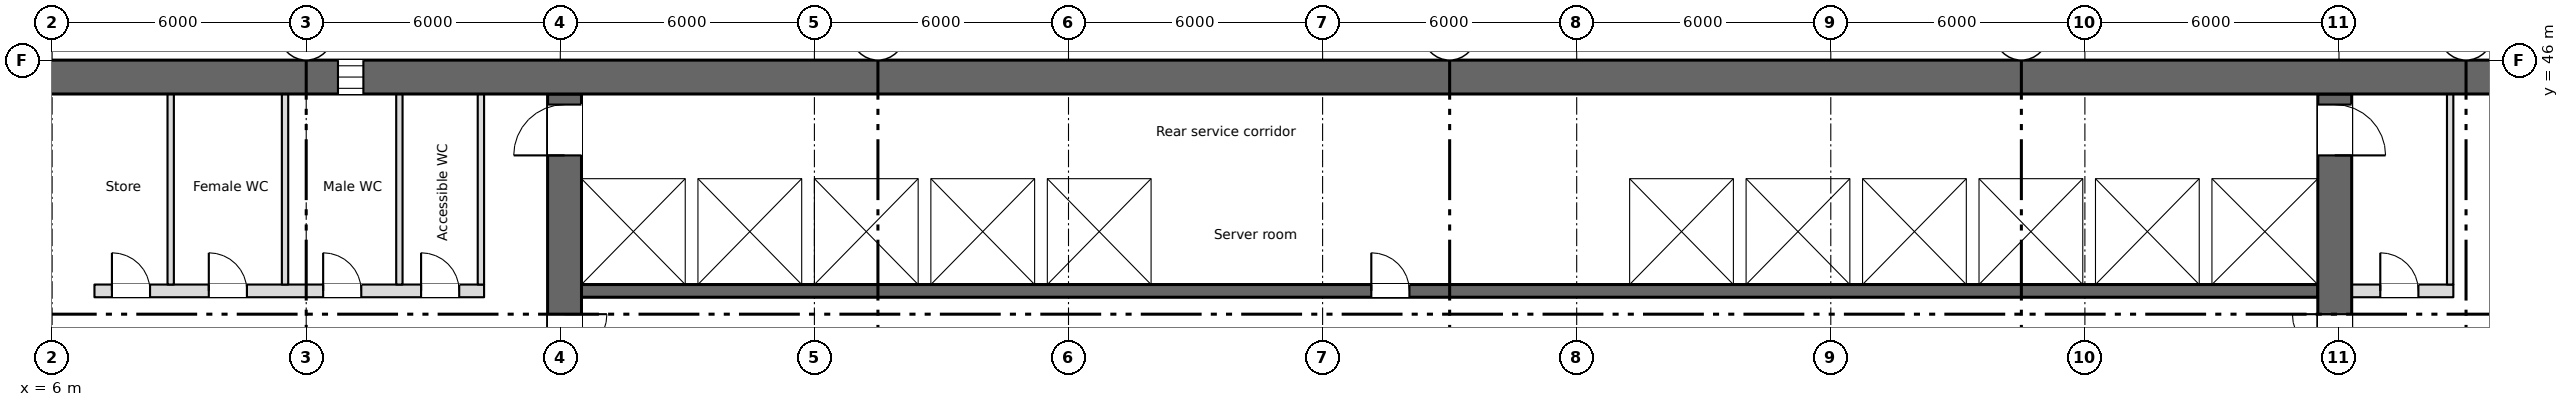
"""IFC4 building model, lengths in metres.
Left out: names, types, materials, properties, quantities, classifications, styles, units other than length and angle.
Written with IfcOpenShell. Run it as: python <this file> out.ifc"""

import sys

from ifc_helpers import new_model, si_unit, direction, frame, frame_2d, origin, place, context, subcontext, project, spatial, rectangle, extrude, element, fill, save


model = new_model("IFC4")
c1 = context("Model", 3, precision=1e-05, world=origin(), true_north=direction((0.0, 1.0)))
c2 = subcontext(c1, "Body", "Model", "MODEL_VIEW")
j1 = project(units=[si_unit("LENGTHUNIT", "METRE"), si_unit("PLANEANGLEUNIT", "RADIAN")], contexts=[c1])
p1 = place(None, origin())
s1 = spatial("IfcSite", under=j1, at=p1, CompositionType="ELEMENT")
p2 = place(p1, origin())
s2 = spatial("IfcBuilding", under=s1, at=p2, CompositionType="ELEMENT")
p3 = place(p2, frame((0.0, 0.0, 128.75)))
s3 = spatial("IfcBuildingStorey", under=s2, at=p3, CompositionType="ELEMENT", Elevation=128.75)
p4 = place(p3, frame((5.55, 45.6, 0.0), z_axis=(0.0, 0.0, 1.0), x_axis=(1.0, 0.0, 0.0)))
e1 = element("IfcWall", 1, at=p4, inside=s3, PredefinedType="SHEAR", context=c2, shape_type="SweptSolid", body=[
    extrude(rectangle(XDim=60.9, YDim=0.8, at=frame_2d((30.45, 0.0))), origin(), (0.0, 0.0, 1.0), 3.35),
])
p5 = place(p4, frame((7.2, 0.0, 0.6)))
e2 = element("IfcOpeningElement", 2, at=p5, cuts=e1, PredefinedType="OPENING", context=c2, shape_type="SweptSolid", body=[
    extrude(rectangle(XDim=0.6, YDim=2.4, at=frame_2d((0.3, 1.2))), frame((0.0, 0.41, 0.0), z_axis=(0.0, -1.0, 0.0), x_axis=(1.0, 0.0, 0.0)), (0.0, 0.0, 1.0), 0.82),
])
p6 = place(p3, frame((6.85, 28.4, 0.0), z_axis=(0.0, 0.0, 1.0), x_axis=(0.0, 1.0, 0.0)))
e3 = element("IfcWall", 3, at=p6, inside=s3, PredefinedType="SHEAR", context=c2, shape_type="SweptSolid", body=[
    extrude(rectangle(XDim=16.8, YDim=0.3, at=frame_2d((8.4, 0.0))), origin(), (0.0, 0.0, 1.0), 3.35),
])
p7 = place(p3, frame((18.1, 28.4, 0.0), z_axis=(0.0, 0.0, 1.0), x_axis=(0.0, 1.0, 0.0)))
e4 = element("IfcWall", 4, at=p7, inside=s3, PredefinedType="SHEAR", context=c2, shape_type="SweptSolid", body=[
    extrude(rectangle(XDim=16.8, YDim=0.8, at=frame_2d((8.4, 0.0))), origin(), (0.0, 0.0, 1.0), 3.35),
])
p8 = place(p7, frame((9.6, 0.0, 0.0)))
e5 = element("IfcOpeningElement", 5, at=p8, cuts=e4, PredefinedType="OPENING", context=c2, shape_type="SweptSolid", body=[
    extrude(rectangle(XDim=2.0, YDim=2.1, at=frame_2d((1.0, 1.05))), frame((0.0, 0.41, 0.0), z_axis=(0.0, -1.0, 0.0), x_axis=(1.0, 0.0, 0.0)), (0.0, 0.0, 1.0), 0.82),
])
p9 = place(p7, frame((15.35, 0.0, 0.0)))
e6 = element("IfcOpeningElement", 6, at=p9, cuts=e4, PredefinedType="OPENING", context=c2, shape_type="SweptSolid", body=[
    extrude(rectangle(XDim=1.2, YDim=2.1, at=frame_2d((0.6, 1.05))), frame((0.0, 0.41, 0.0), z_axis=(0.0, -1.0, 0.0), x_axis=(1.0, 0.0, 0.0)), (0.0, 0.0, 1.0), 0.82),
])
p10 = place(p3, frame((59.9, 28.4, 0.0), z_axis=(0.0, 0.0, 1.0), x_axis=(0.0, 1.0, 0.0)))
e7 = element("IfcWall", 7, at=p10, inside=s3, PredefinedType="SHEAR", context=c2, shape_type="SweptSolid", body=[
    extrude(rectangle(XDim=16.8, YDim=0.8, at=frame_2d((8.4, 0.0))), origin(), (0.0, 0.0, 1.0), 3.35),
])
p11 = place(p10, frame((9.6, 0.0, 0.0)))
e8 = element("IfcOpeningElement", 8, at=p11, cuts=e7, PredefinedType="OPENING", context=c2, shape_type="SweptSolid", body=[
    extrude(rectangle(XDim=2.0, YDim=2.1, at=frame_2d((1.0, 1.05))), frame((0.0, 0.41, 0.0), z_axis=(0.0, -1.0, 0.0), x_axis=(1.0, 0.0, 0.0)), (0.0, 0.0, 1.0), 0.82),
])
p12 = place(p10, frame((15.35, 0.0, 0.0)))
e9 = element("IfcOpeningElement", 9, at=p12, cuts=e7, PredefinedType="OPENING", context=c2, shape_type="SweptSolid", body=[
    extrude(rectangle(XDim=1.2, YDim=2.1, at=frame_2d((0.6, 1.05))), frame((0.0, 0.41, 0.0), z_axis=(0.0, -1.0, 0.0), x_axis=(1.0, 0.0, 0.0)), (0.0, 0.0, 1.0), 0.82),
])
p13 = place(p3, frame((18.5, 40.55, 0.0), z_axis=(0.0, 0.0, 1.0), x_axis=(1.0, 0.0, 0.0)))
e10 = element("IfcWall", 10, at=p13, inside=s3, PredefinedType="SHEAR", context=c2, shape_type="SweptSolid", body=[
    extrude(rectangle(XDim=41.0, YDim=0.3, at=frame_2d((20.5, 0.0))), origin(), (0.0, 0.0, 1.0), 3.35),
])
p14 = place(p13, frame((18.65, 0.0, 0.0)))
e11 = element("IfcOpeningElement", 11, at=p14, cuts=e10, PredefinedType="OPENING", context=c2, shape_type="SweptSolid", body=[
    extrude(rectangle(XDim=0.9, YDim=2.1, at=frame_2d((0.45, 1.05))), frame((0.0, 0.16, 0.0), z_axis=(0.0, -1.0, 0.0), x_axis=(1.0, 0.0, 0.0)), (0.0, 0.0, 1.0), 0.32),
])
p15 = place(p13, frame((6.175, 0.0, 0.0)))
e12 = element("IfcOpeningElement", 12, at=p15, cuts=e10, PredefinedType="OPENING", context=c2, shape_type="SweptSolid", body=[
    extrude(rectangle(XDim=1.1, YDim=2.1, at=frame_2d((0.55, 1.05))), frame((0.0, 0.16, 0.0), z_axis=(0.0, -1.0, 0.0), x_axis=(1.0, 0.0, 0.0)), (0.0, 0.0, 1.0), 0.32),
])
p16 = place(p13, frame((8.925, 0.0, 0.0)))
e13 = element("IfcOpeningElement", 13, at=p16, cuts=e10, PredefinedType="OPENING", context=c2, shape_type="SweptSolid", body=[
    extrude(rectangle(XDim=1.1, YDim=2.1, at=frame_2d((0.55, 1.05))), frame((0.0, 0.16, 0.0), z_axis=(0.0, -1.0, 0.0), x_axis=(1.0, 0.0, 0.0)), (0.0, 0.0, 1.0), 0.32),
])
p17 = place(p13, frame((11.675, 0.0, 0.0)))
e14 = element("IfcOpeningElement", 14, at=p17, cuts=e10, PredefinedType="OPENING", context=c2, shape_type="SweptSolid", body=[
    extrude(rectangle(XDim=1.1, YDim=2.1, at=frame_2d((0.55, 1.05))), frame((0.0, 0.16, 0.0), z_axis=(0.0, -1.0, 0.0), x_axis=(1.0, 0.0, 0.0)), (0.0, 0.0, 1.0), 0.32),
])
p18 = place(p13, frame((30.925, 0.0, 0.0)))
e15 = element("IfcOpeningElement", 15, at=p18, cuts=e10, PredefinedType="OPENING", context=c2, shape_type="SweptSolid", body=[
    extrude(rectangle(XDim=1.1, YDim=2.1, at=frame_2d((0.55, 1.05))), frame((0.0, 0.16, 0.0), z_axis=(0.0, -1.0, 0.0), x_axis=(1.0, 0.0, 0.0)), (0.0, 0.0, 1.0), 0.32),
])
p19 = place(p13, frame((33.675, 0.0, 0.0)))
e16 = element("IfcOpeningElement", 16, at=p19, cuts=e10, PredefinedType="OPENING", context=c2, shape_type="SweptSolid", body=[
    extrude(rectangle(XDim=1.1, YDim=2.1, at=frame_2d((0.55, 1.05))), frame((0.0, 0.16, 0.0), z_axis=(0.0, -1.0, 0.0), x_axis=(1.0, 0.0, 0.0)), (0.0, 0.0, 1.0), 0.32),
])
p20 = place(p13, frame((36.375, 0.0, 0.0)))
e17 = element("IfcOpeningElement", 17, at=p20, cuts=e10, PredefinedType="OPENING", context=c2, shape_type="SweptSolid", body=[
    extrude(rectangle(XDim=1.2, YDim=2.1, at=frame_2d((0.6, 1.05))), frame((0.0, 0.16, 0.0), z_axis=(0.0, -1.0, 0.0), x_axis=(1.0, 0.0, 0.0)), (0.0, 0.0, 1.0), 0.32),
])
p21 = place(p13, frame((39.15, 0.0, 0.0)))
e18 = element("IfcOpeningElement", 18, at=p21, cuts=e10, PredefinedType="OPENING", context=c2, shape_type="SweptSolid", body=[
    extrude(rectangle(XDim=1.2, YDim=2.1, at=frame_2d((0.6, 1.05))), frame((0.0, 0.16, 0.0), z_axis=(0.0, -1.0, 0.0), x_axis=(1.0, 0.0, 0.0)), (0.0, 0.0, 1.0), 0.32),
])
p22 = place(p3, frame((18.5, 43.35, 0.0), z_axis=(0.0, 0.0, 1.0), x_axis=(1.0, 0.0, 0.0)))
e19 = element("IfcWall", 19, at=p22, inside=s3, PredefinedType="SHEAR", context=c2, shape_type="SweptSolid", body=[
    extrude(rectangle(XDim=41.0, YDim=0.3, at=frame_2d((20.5, 0.0))), origin(), (0.0, 0.0, 1.0), 3.35),
])
p23 = place(p3, frame((7.0, 40.55, 0.0), z_axis=(0.0, 0.0, 1.0), x_axis=(1.0, 0.0, 0.0)))
e20 = element("IfcWall", 20, at=p23, inside=s3, PredefinedType="PARTITIONING", context=c2, shape_type="SweptSolid", body=[
    extrude(rectangle(XDim=9.2, YDim=0.3, at=frame_2d((4.6, 0.0))), origin(), (0.0, 0.0, 1.0), 3.35),
])
p24 = place(p23, frame((0.413, 0.0, 0.0)))
e21 = element("IfcOpeningElement", 21, at=p24, cuts=e20, PredefinedType="OPENING", context=c2, shape_type="SweptSolid", body=[
    extrude(rectangle(XDim=0.9, YDim=2.1, at=frame_2d((0.45, 1.05))), frame((0.0, 0.16, 0.0), z_axis=(0.0, -1.0, 0.0), x_axis=(1.0, 0.0, 0.0)), (0.0, 0.0, 1.0), 0.32),
])
p25 = place(p23, frame((2.7, 0.0, 0.0)))
e22 = element("IfcOpeningElement", 22, at=p25, cuts=e20, PredefinedType="OPENING", context=c2, shape_type="SweptSolid", body=[
    extrude(rectangle(XDim=0.9, YDim=2.1, at=frame_2d((0.45, 1.05))), frame((0.0, 0.16, 0.0), z_axis=(0.0, -1.0, 0.0), x_axis=(1.0, 0.0, 0.0)), (0.0, 0.0, 1.0), 0.32),
])
p26 = place(p23, frame((5.4, 0.0, 0.0)))
e23 = element("IfcOpeningElement", 23, at=p26, cuts=e20, PredefinedType="OPENING", context=c2, shape_type="SweptSolid", body=[
    extrude(rectangle(XDim=0.9, YDim=2.1, at=frame_2d((0.45, 1.05))), frame((0.0, 0.16, 0.0), z_axis=(0.0, -1.0, 0.0), x_axis=(1.0, 0.0, 0.0)), (0.0, 0.0, 1.0), 0.32),
])
p27 = place(p23, frame((7.712, 0.0, 0.0)))
e24 = element("IfcOpeningElement", 24, at=p27, cuts=e20, PredefinedType="OPENING", context=c2, shape_type="SweptSolid", body=[
    extrude(rectangle(XDim=0.9, YDim=2.1, at=frame_2d((0.45, 1.05))), frame((0.0, 0.16, 0.0), z_axis=(0.0, -1.0, 0.0), x_axis=(1.0, 0.0, 0.0)), (0.0, 0.0, 1.0), 0.32),
])
p28 = place(p3, frame((60.3, 40.55, 0.0), z_axis=(0.0, 0.0, 1.0), x_axis=(1.0, 0.0, 0.0)))
e25 = element("IfcWall", 25, at=p28, inside=s3, PredefinedType="PARTITIONING", context=c2, shape_type="SweptSolid", body=[
    extrude(rectangle(XDim=2.4, YDim=0.3, at=frame_2d((1.2, 0.0))), origin(), (0.0, 0.0, 1.0), 3.35),
])
p29 = place(p28, frame((0.675, 0.0, 0.0)))
e26 = element("IfcOpeningElement", 26, at=p29, cuts=e25, PredefinedType="OPENING", context=c2, shape_type="SweptSolid", body=[
    extrude(rectangle(XDim=0.9, YDim=2.1, at=frame_2d((0.45, 1.05))), frame((0.0, 0.16, 0.0), z_axis=(0.0, -1.0, 0.0), x_axis=(1.0, 0.0, 0.0)), (0.0, 0.0, 1.0), 0.32),
])
for number, where, z_axis, x_axis in (
    (27, (21.1, 40.7, 0.0), (0.0, 0.0, 1.0), (0.0, 1.0, 0.0)),
    (28, (23.85, 40.7, 0.0), (0.0, 0.0, 1.0), (0.0, 1.0, 0.0)),
    (29, (26.6, 40.7, 0.0), (0.0, 0.0, 1.0), (0.0, 1.0, 0.0)),
    (30, (29.35, 40.7, 0.0), (0.0, 0.0, 1.0), (0.0, 1.0, 0.0)),
    (31, (32.1, 40.7, 0.0), (0.0, 0.0, 1.0), (0.0, 1.0, 0.0)),
    (32, (43.1, 40.7, 0.0), (0.0, 0.0, 1.0), (0.0, 1.0, 0.0)),
    (33, (45.85, 40.7, 0.0), (0.0, 0.0, 1.0), (0.0, 1.0, 0.0)),
    (34, (48.6, 40.7, 0.0), (0.0, 0.0, 1.0), (0.0, 1.0, 0.0)),
    (35, (51.35, 40.7, 0.0), (0.0, 0.0, 1.0), (0.0, 1.0, 0.0)),
    (36, (54.1, 40.7, 0.0), (0.0, 0.0, 1.0), (0.0, 1.0, 0.0)),
    (37, (56.85, 40.7, 0.0), (0.0, 0.0, 1.0), (0.0, 1.0, 0.0)),
):
    element("IfcWall", number, at=place(p3, frame(where, z_axis=z_axis, x_axis=x_axis)), inside=s3, PredefinedType="SHEAR", context=c2, shape_type="SweptSolid", body=[
        extrude(rectangle(XDim=2.5, YDim=0.3, at=frame_2d((1.25, 0.0))), origin(), (0.0, 0.0, 1.0), 3.35),
    ])
for number, where, z_axis, x_axis in (
    (38, (16.125, 40.7, 0.0), (0.0, 0.0, 1.0), (0.0, 1.0, 0.0)),
    (39, (62.625, 40.7, 0.0), (0.0, 0.0, 1.0), (0.0, 1.0, 0.0)),
    (40, (8.8, 40.7, 0.0), (0.0, 0.0, 1.0), (0.0, 1.0, 0.0)),
    (41, (11.5, 40.7, 0.0), (0.0, 0.0, 1.0), (0.0, 1.0, 0.0)),
    (42, (14.2, 40.7, 0.0), (0.0, 0.0, 1.0), (0.0, 1.0, 0.0)),
):
    element("IfcWall", number, at=place(p3, frame(where, z_axis=z_axis, x_axis=x_axis)), inside=s3, PredefinedType="PARTITIONING", context=c2, shape_type="SweptSolid", body=[
        extrude(rectangle(XDim=4.5, YDim=0.15, at=frame_2d((2.25, 0.0))), origin(), (0.0, 0.0, 1.0), 3.35),
    ])
p30 = place(p5, origin())
e43 = element("IfcWindow", 43, at=p30, inside=s3, PartitioningType="SINGLE_PANEL", PredefinedType="WINDOW", context=c2, shape_type="SweptSolid", body=[
    extrude(rectangle(XDim=0.6, YDim=2.4, at=frame_2d((0.3, 1.2))), frame((0.0, 0.03, 0.0), z_axis=(0.0, -1.0, 0.0), x_axis=(1.0, 0.0, 0.0)), (0.0, 0.0, 1.0), 0.06),
])
fill(e2, e43)
p31 = place(p24, origin())
e44 = element("IfcDoor", 44, at=p31, inside=s3, OperationType="SINGLE_SWING_LEFT", PredefinedType="DOOR", context=c2, shape_type="SweptSolid", body=[
    extrude(rectangle(XDim=0.9, YDim=2.1, at=frame_2d((0.45, 1.05))), frame((0.0, 0.025, 0.0), z_axis=(0.0, -1.0, 0.0), x_axis=(1.0, 0.0, 0.0)), (0.0, 0.0, 1.0), 0.05),
])
fill(e21, e44)
p32 = place(p25, origin())
e45 = element("IfcDoor", 45, at=p32, inside=s3, OperationType="SINGLE_SWING_LEFT", PredefinedType="DOOR", context=c2, shape_type="SweptSolid", body=[
    extrude(rectangle(XDim=0.9, YDim=2.1, at=frame_2d((0.45, 1.05))), frame((0.0, 0.025, 0.0), z_axis=(0.0, -1.0, 0.0), x_axis=(1.0, 0.0, 0.0)), (0.0, 0.0, 1.0), 0.05),
])
fill(e22, e45)
p33 = place(p26, origin())
e46 = element("IfcDoor", 46, at=p33, inside=s3, OperationType="SINGLE_SWING_LEFT", PredefinedType="DOOR", context=c2, shape_type="SweptSolid", body=[
    extrude(rectangle(XDim=0.9, YDim=2.1, at=frame_2d((0.45, 1.05))), frame((0.0, 0.025, 0.0), z_axis=(0.0, -1.0, 0.0), x_axis=(1.0, 0.0, 0.0)), (0.0, 0.0, 1.0), 0.05),
])
fill(e23, e46)
p34 = place(p27, origin())
e47 = element("IfcDoor", 47, at=p34, inside=s3, OperationType="SINGLE_SWING_LEFT", PredefinedType="DOOR", context=c2, shape_type="SweptSolid", body=[
    extrude(rectangle(XDim=0.9, YDim=2.1, at=frame_2d((0.45, 1.05))), frame((0.0, 0.025, 0.0), z_axis=(0.0, -1.0, 0.0), x_axis=(1.0, 0.0, 0.0)), (0.0, 0.0, 1.0), 0.05),
])
fill(e24, e47)
p35 = place(p29, origin())
e48 = element("IfcDoor", 48, at=p35, inside=s3, OperationType="SINGLE_SWING_LEFT", PredefinedType="DOOR", context=c2, shape_type="SweptSolid", body=[
    extrude(rectangle(XDim=0.9, YDim=2.1, at=frame_2d((0.45, 1.05))), frame((0.0, 0.025, 0.0), z_axis=(0.0, -1.0, 0.0), x_axis=(1.0, 0.0, 0.0)), (0.0, 0.0, 1.0), 0.05),
])
fill(e26, e48)
p36 = place(p14, origin())
e49 = element("IfcDoor", 49, at=p36, inside=s3, OperationType="SINGLE_SWING_LEFT", PredefinedType="DOOR", context=c2, shape_type="SweptSolid", body=[
    extrude(rectangle(XDim=0.9, YDim=2.1, at=frame_2d((0.45, 1.05))), frame((0.0, 0.025, 0.0), z_axis=(0.0, -1.0, 0.0), x_axis=(1.0, 0.0, 0.0)), (0.0, 0.0, 1.0), 0.05),
])
fill(e11, e49)
p37 = place(p15, origin())
e50 = element("IfcDoor", 50, at=p37, inside=s3, OperationType="SLIDING_TO_LEFT", PredefinedType="DOOR", context=c2, shape_type="SweptSolid", body=[
    extrude(rectangle(XDim=1.1, YDim=2.1, at=frame_2d((0.55, 1.05))), frame((0.0, 0.025, 0.0), z_axis=(0.0, -1.0, 0.0), x_axis=(1.0, 0.0, 0.0)), (0.0, 0.0, 1.0), 0.05),
])
fill(e12, e50)
p38 = place(p16, origin())
e51 = element("IfcDoor", 51, at=p38, inside=s3, OperationType="SLIDING_TO_LEFT", PredefinedType="DOOR", context=c2, shape_type="SweptSolid", body=[
    extrude(rectangle(XDim=1.1, YDim=2.1, at=frame_2d((0.55, 1.05))), frame((0.0, 0.025, 0.0), z_axis=(0.0, -1.0, 0.0), x_axis=(1.0, 0.0, 0.0)), (0.0, 0.0, 1.0), 0.05),
])
fill(e13, e51)
p39 = place(p17, origin())
e52 = element("IfcDoor", 52, at=p39, inside=s3, OperationType="SLIDING_TO_LEFT", PredefinedType="DOOR", context=c2, shape_type="SweptSolid", body=[
    extrude(rectangle(XDim=1.1, YDim=2.1, at=frame_2d((0.55, 1.05))), frame((0.0, 0.025, 0.0), z_axis=(0.0, -1.0, 0.0), x_axis=(1.0, 0.0, 0.0)), (0.0, 0.0, 1.0), 0.05),
])
fill(e14, e52)
p40 = place(p18, origin())
e53 = element("IfcDoor", 53, at=p40, inside=s3, OperationType="SLIDING_TO_LEFT", PredefinedType="DOOR", context=c2, shape_type="SweptSolid", body=[
    extrude(rectangle(XDim=1.1, YDim=2.1, at=frame_2d((0.55, 1.05))), frame((0.0, 0.025, 0.0), z_axis=(0.0, -1.0, 0.0), x_axis=(1.0, 0.0, 0.0)), (0.0, 0.0, 1.0), 0.05),
])
fill(e15, e53)
p41 = place(p19, origin())
e54 = element("IfcDoor", 54, at=p41, inside=s3, OperationType="SLIDING_TO_LEFT", PredefinedType="DOOR", context=c2, shape_type="SweptSolid", body=[
    extrude(rectangle(XDim=1.1, YDim=2.1, at=frame_2d((0.55, 1.05))), frame((0.0, 0.025, 0.0), z_axis=(0.0, -1.0, 0.0), x_axis=(1.0, 0.0, 0.0)), (0.0, 0.0, 1.0), 0.05),
])
fill(e16, e54)
p42 = place(p20, origin())
e55 = element("IfcDoor", 55, at=p42, inside=s3, OperationType="SLIDING_TO_LEFT", PredefinedType="DOOR", context=c2, shape_type="SweptSolid", body=[
    extrude(rectangle(XDim=1.2, YDim=2.1, at=frame_2d((0.6, 1.05))), frame((0.0, 0.025, 0.0), z_axis=(0.0, -1.0, 0.0), x_axis=(1.0, 0.0, 0.0)), (0.0, 0.0, 1.0), 0.05),
])
fill(e17, e55)
p43 = place(p21, origin())
e56 = element("IfcDoor", 56, at=p43, inside=s3, OperationType="SLIDING_TO_LEFT", PredefinedType="DOOR", context=c2, shape_type="SweptSolid", body=[
    extrude(rectangle(XDim=1.2, YDim=2.1, at=frame_2d((0.6, 1.05))), frame((0.0, 0.025, 0.0), z_axis=(0.0, -1.0, 0.0), x_axis=(1.0, 0.0, 0.0)), (0.0, 0.0, 1.0), 0.05),
])
fill(e18, e56)
p44 = place(p8, origin())
e57 = element("IfcDoor", 57, at=p44, inside=s3, OperationType="DOUBLE_DOOR_SINGLE_SWING", PredefinedType="DOOR", context=c2, shape_type="SweptSolid", body=[
    extrude(rectangle(XDim=2.0, YDim=2.1, at=frame_2d((1.0, 1.05))), frame((0.0, 0.025, 0.0), z_axis=(0.0, -1.0, 0.0), x_axis=(1.0, 0.0, 0.0)), (0.0, 0.0, 1.0), 0.05),
])
fill(e5, e57)
p45 = place(p11, origin())
e58 = element("IfcDoor", 58, at=p45, inside=s3, OperationType="DOUBLE_DOOR_SINGLE_SWING", PredefinedType="DOOR", context=c2, shape_type="SweptSolid", body=[
    extrude(rectangle(XDim=2.0, YDim=2.1, at=frame_2d((1.0, 1.05))), frame((0.0, 0.025, 0.0), z_axis=(0.0, -1.0, 0.0), x_axis=(1.0, 0.0, 0.0)), (0.0, 0.0, 1.0), 0.05),
])
fill(e8, e58)
p46 = place(p9, origin())
e59 = element("IfcDoor", 59, at=p46, inside=s3, OperationType="SINGLE_SWING_LEFT", PredefinedType="DOOR", context=c2, shape_type="SweptSolid", body=[
    extrude(rectangle(XDim=1.2, YDim=2.1, at=frame_2d((0.6, 1.05))), frame((0.0, 0.025, 0.0), z_axis=(0.0, -1.0, 0.0), x_axis=(1.0, 0.0, 0.0)), (0.0, 0.0, 1.0), 0.05),
])
fill(e6, e59)
p47 = place(p12, origin())
e60 = element("IfcDoor", 60, at=p47, inside=s3, OperationType="SINGLE_SWING_LEFT", PredefinedType="DOOR", context=c2, shape_type="SweptSolid", body=[
    extrude(rectangle(XDim=1.2, YDim=2.1, at=frame_2d((0.6, 1.05))), frame((0.0, 0.025, 0.0), z_axis=(0.0, -1.0, 0.0), x_axis=(1.0, 0.0, 0.0)), (0.0, 0.0, 1.0), 0.05),
])
fill(e9, e60)
save(model, sys.argv[1])
